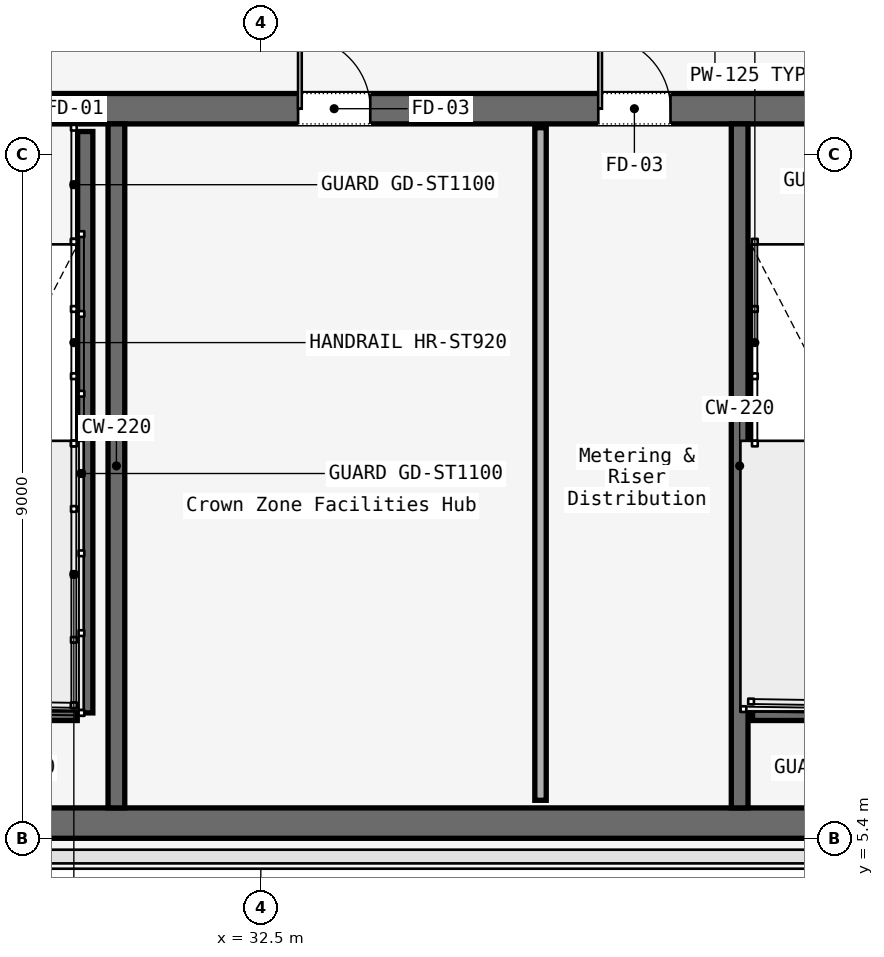
"""IFC4 building model, lengths in metres.
Left out: names, types, materials, properties, quantities, classifications, styles, units other than length and angle.
Written with IfcOpenShell. Run it as: python <this file> out.ifc"""

import sys

from ifc_helpers import new_model, si_unit, direction, frame, frame_2d, origin, place, context, subcontext, project, spatial, rectangle, extrude, element, fill, save


model = new_model("IFC4")
c1 = context("Model", 3, precision=1e-05, world=origin(), true_north=direction((0.0, 1.0)))
c2 = subcontext(c1, "Body", "Model", "MODEL_VIEW")
j1 = project(units=[si_unit("LENGTHUNIT", "METRE"), si_unit("PLANEANGLEUNIT", "RADIAN")], contexts=[c1])
p1 = place(None, origin())
s1 = spatial("IfcSite", under=j1, at=p1, CompositionType="ELEMENT")
p2 = place(p1, origin())
s2 = spatial("IfcBuilding", under=s1, at=p2, CompositionType="ELEMENT")
p3 = place(p2, frame((0.0, 0.0, 267.4)))
s3 = spatial("IfcBuildingStorey", under=s2, at=p3, CompositionType="ELEMENT", Elevation=267.4)
p4 = place(p3, frame((26.45, 15.0, 0.0), z_axis=(0.0, 0.0, 1.0), x_axis=(1.0, 0.0, 0.0)))
e1 = element("IfcWall", 1, at=p4, inside=s3, PredefinedType="SOLIDWALL", context=c2, shape_type="SweptSolid", body=[
    extrude(rectangle(XDim=31.1, YDim=0.4, at=frame_2d((15.55, 0.0))), origin(), (0.0, 0.0, 1.0), 3.58),
])
p5 = place(p4, frame((1.65, 0.0, 0.0)))
e2 = element("IfcOpeningElement", 2, at=p5, cuts=e1, PredefinedType="OPENING", context=c2, shape_type="SweptSolid", body=[
    extrude(rectangle(XDim=1.1, YDim=2.2, at=frame_2d((0.55, 1.1))), frame((0.0, 0.2, 0.0), z_axis=(0.0, -1.0, 0.0), x_axis=(1.0, 0.0, 0.0)), (0.0, 0.0, 1.0), 0.4),
])
p6 = place(p4, frame((13.65, 0.0, 0.0)))
e3 = element("IfcOpeningElement", 3, at=p6, cuts=e1, PredefinedType="OPENING", context=c2, shape_type="SweptSolid", body=[
    extrude(rectangle(XDim=1.1, YDim=2.2, at=frame_2d((0.55, 1.1))), frame((0.0, 0.2, 0.0), z_axis=(0.0, -1.0, 0.0), x_axis=(1.0, 0.0, 0.0)), (0.0, 0.0, 1.0), 0.4),
])
p7 = place(p4, frame((25.55, 0.0, 0.0)))
e4 = element("IfcOpeningElement", 4, at=p7, cuts=e1, PredefinedType="OPENING", context=c2, shape_type="SweptSolid", body=[
    extrude(rectangle(XDim=1.1, YDim=2.2, at=frame_2d((0.55, 1.1))), frame((0.0, 0.2, 0.0), z_axis=(0.0, -1.0, 0.0), x_axis=(1.0, 0.0, 0.0)), (0.0, 0.0, 1.0), 0.4),
])
p8 = place(p4, frame((19.35, 0.0, 0.0)))
e5 = element("IfcOpeningElement", 5, at=p8, cuts=e1, PredefinedType="OPENING", context=c2, shape_type="SweptSolid", body=[
    extrude(rectangle(XDim=1.1, YDim=2.2, at=frame_2d((0.55, 1.1))), frame((0.0, 0.2, 0.0), z_axis=(0.0, -1.0, 0.0), x_axis=(1.0, 0.0, 0.0)), (0.0, 0.0, 1.0), 0.4),
])
p9 = place(p4, frame((21.4, 0.0, 0.0)))
e6 = element("IfcOpeningElement", 6, at=p9, cuts=e1, PredefinedType="OPENING", context=c2, shape_type="SweptSolid", body=[
    extrude(rectangle(XDim=0.9, YDim=2.1, at=frame_2d((0.45, 1.05))), frame((0.0, 0.2, 0.0), z_axis=(0.0, -1.0, 0.0), x_axis=(1.0, 0.0, 0.0)), (0.0, 0.0, 1.0), 0.4),
])
p10 = place(p4, frame((6.54, 0.0, 0.0)))
e7 = element("IfcOpeningElement", 7, at=p10, cuts=e1, PredefinedType="OPENING", context=c2, shape_type="SweptSolid", body=[
    extrude(rectangle(XDim=0.95, YDim=2.2, at=frame_2d((0.475, 1.1))), frame((0.0, 0.2, 0.0), z_axis=(0.0, -1.0, 0.0), x_axis=(1.0, 0.0, 0.0)), (0.0, 0.0, 1.0), 0.4),
])
p11 = place(p4, frame((10.49, 0.0, 0.0)))
e8 = element("IfcOpeningElement", 8, at=p11, cuts=e1, PredefinedType="OPENING", context=c2, shape_type="SweptSolid", body=[
    extrude(rectangle(XDim=0.95, YDim=2.2, at=frame_2d((0.475, 1.1))), frame((0.0, 0.2, 0.0), z_axis=(0.0, -1.0, 0.0), x_axis=(1.0, 0.0, 0.0)), (0.0, 0.0, 1.0), 0.4),
])
p12 = place(p4, frame((23.35, 0.0, 0.0)))
e9 = element("IfcOpeningElement", 9, at=p12, cuts=e1, PredefinedType="OPENING", context=c2, shape_type="SweptSolid", body=[
    extrude(rectangle(XDim=1.3, YDim=2.3, at=frame_2d((0.65, 1.15))), frame((0.0, 0.2, 0.0), z_axis=(0.0, -1.0, 0.0), x_axis=(1.0, 0.0, 0.0)), (0.0, 0.0, 1.0), 0.4),
])
p13 = place(p3, frame((26.45, 5.6, 0.0), z_axis=(0.0, 0.0, 1.0), x_axis=(1.0, 0.0, 0.0)))
e10 = element("IfcWall", 10, at=p13, inside=s3, PredefinedType="SOLIDWALL", context=c2, shape_type="SweptSolid", body=[
    extrude(rectangle(XDim=31.1, YDim=0.4, at=frame_2d((15.55, 0.0))), origin(), (0.0, 0.0, 1.0), 3.58),
])
for number, where, z_axis, x_axis in (
    (11, (30.6, 5.8, 0.0), (0.0, 0.0, 1.0), (0.0, 1.0, 0.0)),
    (12, (38.8, 5.8, 0.0), (0.0, 0.0, 1.0), (0.0, 1.0, 0.0)),
):
    element("IfcWall", number, at=place(p3, frame(where, z_axis=z_axis, x_axis=x_axis)), inside=s3, PredefinedType="SOLIDWALL", context=c2, shape_type="SweptSolid", body=[
        extrude(rectangle(XDim=9.0, YDim=0.22, at=frame_2d((4.5, 0.0))), origin(), (0.0, 0.0, 1.0), 3.58),
    ])
p14 = place(p3, frame((30.19, 14.7, 0.0), z_axis=(0.0, 0.0, 1.0), x_axis=(0.0, -1.0, 0.0)))
e13 = element("IfcWall", 13, at=p14, inside=s3, PredefinedType="SOLIDWALL", context=c2, shape_type="SweptSolid", body=[
    extrude(rectangle(XDim=7.65, YDim=0.2, at=frame_2d((3.825, 0.0))), origin(), (0.0, 0.0, 1.0), 3.8),
])
for number, where, z_axis, x_axis in (
    (14, (26.97, 7.05, 0.0), (0.0, 0.0, 1.0), (1.0, 0.0, 0.0)),
    (15, (38.97, 7.05, 0.0), (0.0, 0.0, 1.0), (1.0, 0.0, 0.0)),
):
    element("IfcWall", number, at=place(p3, frame(where, z_axis=z_axis, x_axis=x_axis)), inside=s3, PredefinedType="SOLIDWALL", context=c2, shape_type="SweptSolid", body=[
        extrude(rectangle(XDim=3.115, YDim=0.2, at=frame_2d((1.558, 0.0))), origin(), (0.0, 0.0, 1.0), 3.8),
    ])
p15 = place(p3, frame((36.18, 5.9, 0.0), z_axis=(0.0, 0.0, 1.0), x_axis=(0.0, 1.0, 0.0)))
e16 = element("IfcWall", 16, at=p15, inside=s3, PredefinedType="PARTITIONING", context=c2, shape_type="SweptSolid", body=[
    extrude(rectangle(XDim=8.85, YDim=0.15, at=frame_2d((4.425, 0.0))), origin(), (0.0, 0.0, 1.0), 3.01),
])
p16 = place(p10, origin())
e17 = element("IfcDoor", 17, at=p16, inside=s3, OperationType="SINGLE_SWING_LEFT", PredefinedType="DOOR", context=c2, shape_type="SweptSolid", body=[
    extrude(rectangle(XDim=0.95, YDim=2.2, at=frame_2d((0.475, 1.1))), frame((0.0, 0.025, 0.0), z_axis=(0.0, -1.0, 0.0), x_axis=(1.0, 0.0, 0.0)), (0.0, 0.0, 1.0), 0.05),
])
fill(e7, e17)
p17 = place(p11, origin())
e18 = element("IfcDoor", 18, at=p17, inside=s3, OperationType="SINGLE_SWING_RIGHT", PredefinedType="DOOR", context=c2, shape_type="SweptSolid", body=[
    extrude(rectangle(XDim=0.95, YDim=2.2, at=frame_2d((0.475, 1.1))), frame((0.0, 0.025, 0.0), z_axis=(0.0, -1.0, 0.0), x_axis=(1.0, 0.0, 0.0)), (0.0, 0.0, 1.0), 0.05),
])
fill(e8, e18)
save(model, sys.argv[1])
